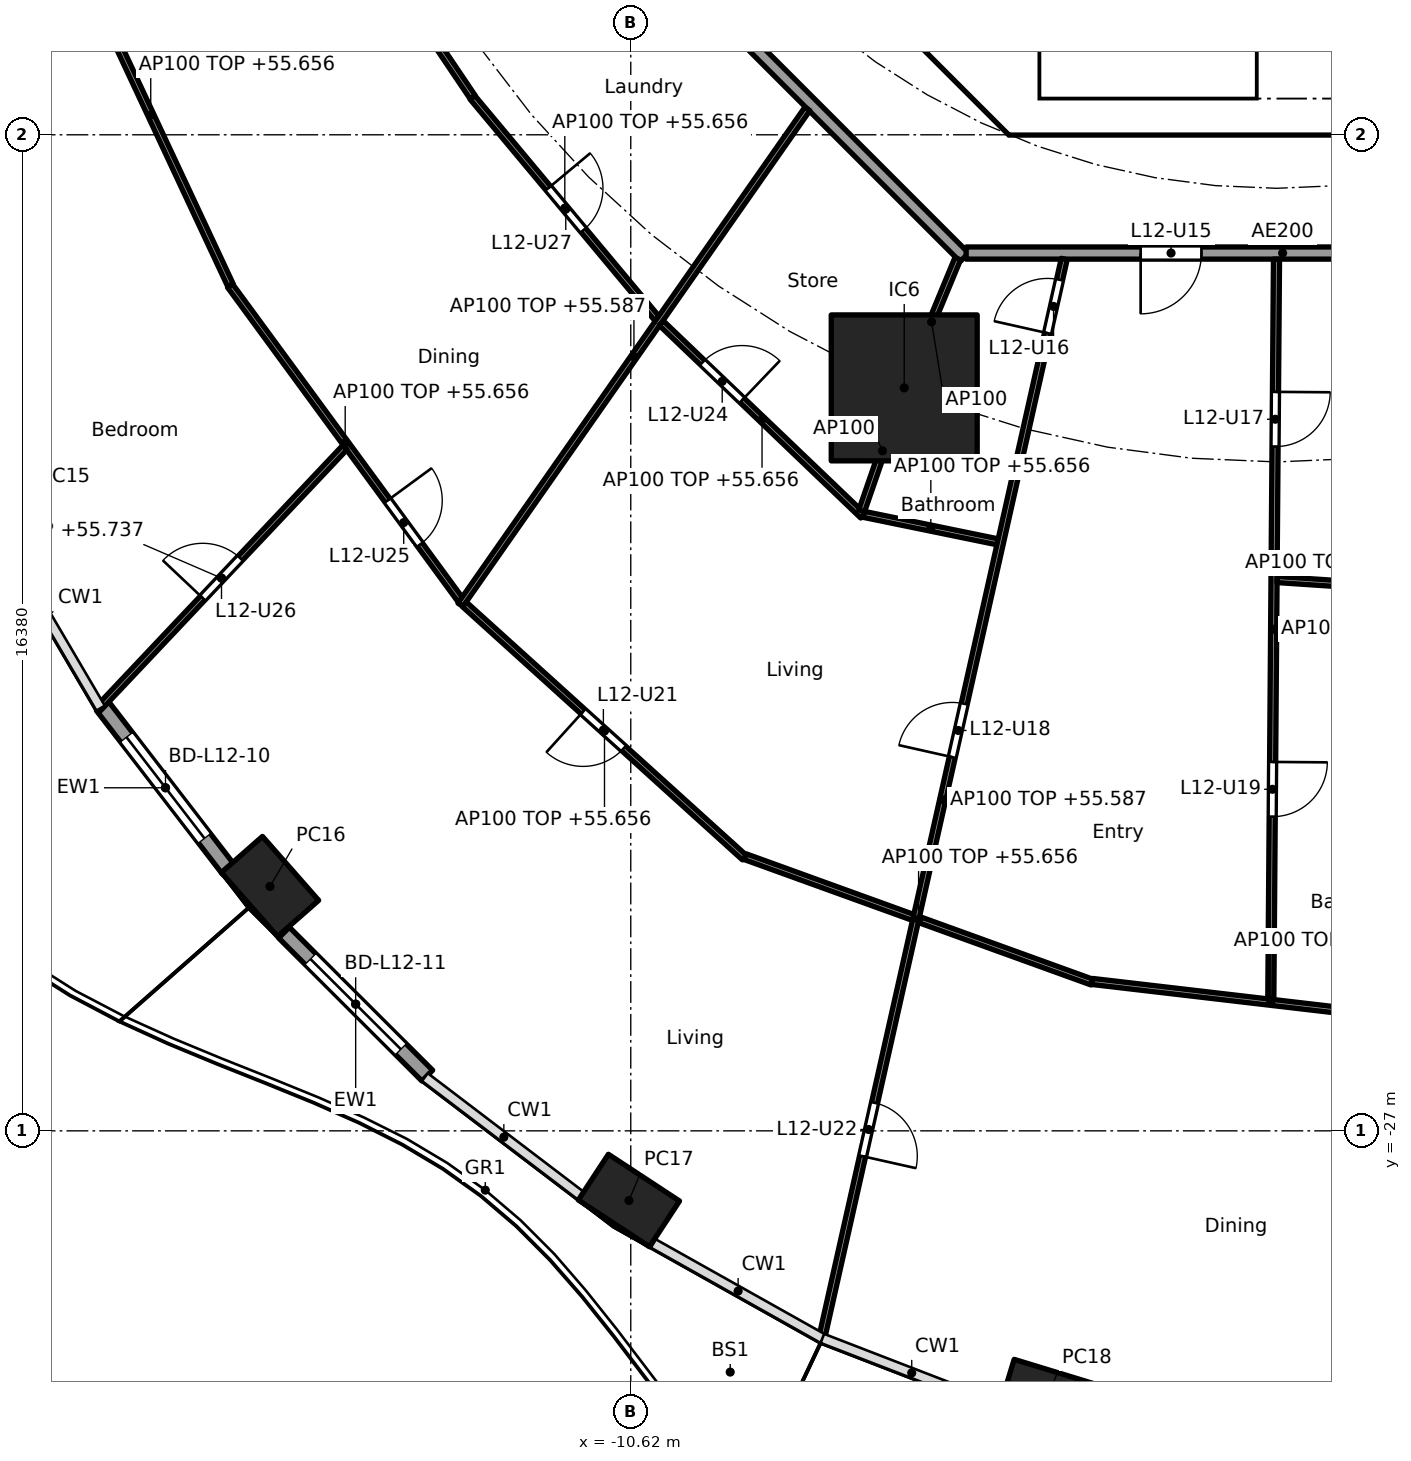
"""IFC4 building model, lengths in metres.
Left out: names, types, materials, properties, quantities, classifications, styles, units other than length and angle.
Written with IfcOpenShell. Run it as: python <this file> out.ifc"""

import sys

from ifc_helpers import new_model, si_unit, direction, frame, frame_2d, origin, origin_2d, place, context, subcontext, project, spatial, polyline, rectangle, hollow_rectangle, outline, extrude, element, fill, save


model = new_model("IFC4")
c1 = context("Model", 3, precision=1e-05, world=origin(), true_north=direction((0.0, 1.0)))
c2 = subcontext(c1, "Body", "Model", "MODEL_VIEW")
j1 = project(units=[si_unit("LENGTHUNIT", "METRE"), si_unit("PLANEANGLEUNIT", "RADIAN")], contexts=[c1])
p1 = place(None, origin())
s1 = spatial("IfcSite", under=j1, at=p1, CompositionType="ELEMENT")
p2 = place(p1, origin())
s2 = spatial("IfcBuilding", under=s1, at=p2, CompositionType="ELEMENT")
p3 = place(p2, frame((0.0, 0.0, 52.9)))
s3 = spatial("IfcBuildingStorey", under=s2, at=p3, CompositionType="ELEMENT", Elevation=52.9)
for number, where, z_axis, x_axis in (
    (1, (-16.552, -22.981, 0.0), (0.0, 0.0, 1.0), (0.66, -0.751, 0.0)),
    (2, (-10.65, -28.146, 0.0), (0.0, 0.0, 1.0), (0.836, -0.549, 0.0)),
    (3, (-3.776, -31.393, 0.0), (0.0, 0.0, 1.0), (0.957, -0.292, 0.0)),
):
    element("IfcColumn", number, at=place(p3, frame(where, z_axis=z_axis, x_axis=x_axis)), inside=s3, PredefinedType="COLUMN", context=c2, shape_type="SweptSolid", body=[
        extrude(hollow_rectangle(XDim=1.4, YDim=0.9, WallThickness=0.05, at=origin_2d()), origin(), (0.0, 0.0, 1.0), 3.7),
    ])
p4 = place(p3, frame((-6.123, -14.782, 0.0), z_axis=(0.0, 0.0, 1.0), x_axis=(1.0, 0.0, 0.0)))
e4 = element("IfcColumn", 4, at=p4, inside=s3, PredefinedType="COLUMN", context=c2, shape_type="SweptSolid", body=[
    extrude(rectangle(XDim=2.4, YDim=2.4, at=origin_2d()), origin(), (0.0, 0.0, 1.0), 3.7),
])
p5 = place(p3, frame((-17.234, -22.704, 0.0), z_axis=(0.0, 0.0, 1.0), x_axis=(-0.610457147657, 0.792049285635, 0.0)))
e5 = element("IfcWall", 5, at=p5, inside=s3, PredefinedType="SOLIDWALL", context=c2, shape_type="SweptSolid", body=[
    extrude(rectangle(XDim=3.397, YDim=0.25, at=frame_2d((1.699, 0.0))), origin(), (0.0, 0.0, 1.0), 3.44),
])
p6 = place(p5, frame((0.649, 0.0, 0.0)))
e6 = element("IfcOpeningElement", 6, at=p6, cuts=e5, PredefinedType="OPENING", context=c2, shape_type="SweptSolid", body=[
    extrude(rectangle(XDim=2.1, YDim=2.4, at=frame_2d((1.05, 1.2))), frame((0.0, 0.135, 0.0), z_axis=(0.0, -1.0, 0.0), x_axis=(1.0, 0.0, 0.0)), (0.0, 0.0, 1.0), 0.27),
])
p7 = place(p3, frame((-13.966, -26.092, 0.0), z_axis=(0.0, 0.0, 1.0), x_axis=(-0.707803094595, 0.706409781417, 0.0)))
e7 = element("IfcWall", 7, at=p7, inside=s3, PredefinedType="SOLIDWALL", context=c2, shape_type="SweptSolid", body=[
    extrude(rectangle(XDim=3.329, YDim=0.25, at=frame_2d((1.665, 0.0))), origin(), (0.0, 0.0, 1.0), 3.44),
])
p8 = place(p7, frame((0.615, 0.0, 0.0)))
e8 = element("IfcOpeningElement", 8, at=p8, cuts=e7, PredefinedType="OPENING", context=c2, shape_type="SweptSolid", body=[
    extrude(rectangle(XDim=2.1, YDim=2.4, at=frame_2d((1.05, 1.2))), frame((0.0, 0.135, 0.0), z_axis=(0.0, -1.0, 0.0), x_axis=(1.0, 0.0, 0.0)), (0.0, 0.0, 1.0), 0.27),
])
p9 = place(p3, frame((-9.988, -4.613, 0.0), z_axis=(0.0, 0.0, 1.0), x_axis=(0.707106781187, -0.707106781187, 0.0)))
e9 = element("IfcWall", 9, at=p9, inside=s3, PredefinedType="SHEAR", context=c2, shape_type="SweptSolid", body=[
    extrude(rectangle(XDim=7.602, YDim=0.6, at=frame_2d((3.801, 0.0))), origin(), (0.0, 0.0, 1.0), 3.44),
])
p10 = place(p9, frame((6.151, 0.0, 0.0)))
e10 = element("IfcOpeningElement", 10, at=p10, cuts=e9, PredefinedType="OPENING", context=c2, shape_type="SweptSolid", body=[
    extrude(rectangle(XDim=1.1, YDim=2.1, at=frame_2d((0.55, 1.05))), frame((0.0, 0.31, 0.0), z_axis=(0.0, -1.0, 0.0), x_axis=(1.0, 0.0, 0.0)), (0.0, 0.0, 1.0), 0.62),
])
p11 = place(p3, origin())
e11 = element("IfcWall", 11, at=p11, inside=s3, PredefinedType="SHEAR", context=c2, shape_type="SweptSolid", body=[
    extrude(outline(polyline([(-4.152, -10.025), (4.152, -10.025), (4.401, -9.776), (4.825, -10.2), (4.401, -10.625), (-4.401, -10.625), (-4.825, -10.2), (-4.401, -9.776), (-4.152, -10.025)])), origin(), (0.0, 0.0, 1.0), 3.44),
])
p12 = place(p3, origin())
e12 = element("IfcWall", 12, at=p12, inside=s3, PredefinedType="SOLIDWALL", context=c2, shape_type="SweptSolid", body=[
    extrude(outline(polyline([(-3.9, -10.025), (-4.1, -10.025), (-4.1, -7.025), (-3.9, -7.025), (-3.9, -10.025)])), origin(), (0.0, 0.0, 1.0), 3.44),
])
p13 = place(p3, frame((-12.635, -5.134, 0.0), z_axis=(0.0, 0.0, 1.0), x_axis=(0.707106781187, -0.707106781187, 0.0)))
e13 = element("IfcWall", 13, at=p13, inside=s3, PredefinedType="PARTITIONING", context=c2, shape_type="SweptSolid", body=[
    extrude(rectangle(XDim=10.609, YDim=0.2, at=frame_2d((5.305, 0.0))), origin(), (0.0, 0.0, 1.0), 3.44),
])
p14 = place(p3, frame((-5.104, -12.565, 0.0), z_axis=(0.0, 0.0, 1.0), x_axis=(1.0, 0.0, 0.0)))
e14 = element("IfcWall", 14, at=p14, inside=s3, PredefinedType="PARTITIONING", context=c2, shape_type="SweptSolid", body=[
    extrude(rectangle(XDim=10.409, YDim=0.2, at=frame_2d((5.205, 0.0))), origin(), (0.0, 0.0, 1.0), 3.44),
])
p15 = place(p14, frame((2.87, 0.0, 0.0)))
e15 = element("IfcOpeningElement", 15, at=p15, cuts=e14, PredefinedType="OPENING", context=c2, shape_type="SweptSolid", body=[
    extrude(rectangle(XDim=1.0, YDim=2.1, at=frame_2d((0.5, 1.05))), frame((0.0, 0.11, 0.0), z_axis=(0.0, -1.0, 0.0), x_axis=(1.0, 0.0, 0.0)), (0.0, 0.0, 1.0), 0.22),
])
p16 = place(p3, frame((-15.627, -6.432, 0.0), z_axis=(0.0, 0.0, 1.0), x_axis=(0.559112679527, -0.829091678641, 0.0)))
e16 = element("IfcWall", 16, at=p16, inside=s3, PredefinedType="PARTITIONING", context=c2, shape_type="SweptSolid", body=[
    extrude(rectangle(XDim=4.308, YDim=0.1, at=frame_2d((2.154, 0.0))), origin(), (0.0, 0.0, 1.0), 3.44),
])
p17 = place(p3, frame((-19.826, -7.491, 0.0), z_axis=(0.0, 0.0, 1.0), x_axis=(0.423926333401, -0.905696673202, 0.0)))
e17 = element("IfcWall", 17, at=p17, inside=s3, PredefinedType="PARTITIONING", context=c2, shape_type="SweptSolid", body=[
    extrude(rectangle(XDim=6.188, YDim=0.1, at=frame_2d((3.094, 0.0))), origin(), (0.0, 0.0, 1.0), 2.756),
])
p18 = place(p3, frame((-13.222, -10.007, 0.0), z_axis=(0.0, 0.0, 1.0), x_axis=(0.640807748916, -0.767701393075, 0.0)))
e18 = element("IfcWall", 18, at=p18, inside=s3, PredefinedType="PARTITIONING", context=c2, shape_type="SweptSolid", body=[
    extrude(rectangle(XDim=4.737, YDim=0.1, at=frame_2d((2.368, 0.0))), origin(), (0.0, 0.0, 1.0), 2.756),
])
p19 = place(p18, frame((1.943, 0.0, 0.0)))
e19 = element("IfcOpeningElement", 19, at=p19, cuts=e18, PredefinedType="OPENING", context=c2, shape_type="SweptSolid", body=[
    extrude(rectangle(XDim=0.9, YDim=2.1, at=frame_2d((0.45, 1.05))), frame((0.0, 0.06, 0.0), z_axis=(0.0, -1.0, 0.0), x_axis=(1.0, 0.0, 0.0)), (0.0, 0.0, 1.0), 0.12),
])
p20 = place(p3, frame((-17.211, -13.1, 0.0), z_axis=(0.0, 0.0, 1.0), x_axis=(0.591206785834, -0.806520016109, 0.0)))
e20 = element("IfcWall", 20, at=p20, inside=s3, PredefinedType="PARTITIONING", context=c2, shape_type="SweptSolid", body=[
    extrude(rectangle(XDim=6.41, YDim=0.1, at=frame_2d((3.205, 0.0))), origin(), (0.0, 0.0, 1.0), 2.756),
])
p21 = place(p20, frame((4.383, 0.0, 0.0)))
e21 = element("IfcOpeningElement", 21, at=p21, cuts=e20, PredefinedType="OPENING", context=c2, shape_type="SweptSolid", body=[
    extrude(rectangle(XDim=0.9, YDim=2.1, at=frame_2d((0.45, 1.05))), frame((0.0, 0.06, 0.0), z_axis=(0.0, -1.0, 0.0), x_axis=(1.0, 0.0, 0.0)), (0.0, 0.0, 1.0), 0.12),
])
p22 = place(p3, frame((-15.321, -15.761, 0.0), z_axis=(0.0, 0.0, 1.0), x_axis=(-0.686519245775, -0.727111631856, 0.0)))
e22 = element("IfcWall", 22, at=p22, inside=s3, PredefinedType="PARTITIONING", context=c2, shape_type="SweptSolid", body=[
    extrude(rectangle(XDim=5.912, YDim=0.1, at=frame_2d((2.956, 0.0))), origin(), (0.0, 0.0, 1.0), 2.837),
])
p23 = place(p22, frame((2.506, 0.0, 0.0)))
e23 = element("IfcOpeningElement", 23, at=p23, cuts=e22, PredefinedType="OPENING", context=c2, shape_type="SweptSolid", body=[
    extrude(rectangle(XDim=0.9, YDim=2.1, at=frame_2d((0.45, 1.05))), frame((0.0, 0.06, 0.0), z_axis=(0.0, -1.0, 0.0), x_axis=(1.0, 0.0, 0.0)), (0.0, 0.0, 1.0), 0.12),
])
p24 = place(p3, frame((-7.715, -10.193, 0.0), z_axis=(0.0, 0.0, 1.0), x_axis=(-0.573126502256, -0.819466907454, 0.0)))
e24 = element("IfcWall", 24, at=p24, inside=s3, PredefinedType="PARTITIONING", context=c2, shape_type="SweptSolid", body=[
    extrude(rectangle(XDim=9.954, YDim=0.1, at=frame_2d((4.977, 0.0))), origin(), (0.0, 0.0, 1.0), 2.687),
])
p25 = place(p3, frame((-10.119, -13.716, 0.0), z_axis=(0.0, 0.0, 1.0), x_axis=(0.722763212502, -0.69109575216, 0.0)))
e25 = element("IfcWall", 25, at=p25, inside=s3, PredefinedType="PARTITIONING", context=c2, shape_type="SweptSolid", body=[
    extrude(rectangle(XDim=4.587, YDim=0.1, at=frame_2d((2.293, 0.0))), origin(), (0.0, 0.0, 1.0), 2.756),
])
p26 = place(p25, frame((0.938, 0.0, 0.0)))
e26 = element("IfcOpeningElement", 26, at=p26, cuts=e25, PredefinedType="OPENING", context=c2, shape_type="SweptSolid", body=[
    extrude(rectangle(XDim=0.9, YDim=2.1, at=frame_2d((0.45, 1.05))), frame((0.0, 0.06, 0.0), z_axis=(0.0, -1.0, 0.0), x_axis=(1.0, 0.0, 0.0)), (0.0, 0.0, 1.0), 0.12),
])
p27 = place(p3, frame((-13.355, -18.343, 0.0), z_axis=(0.0, 0.0, 1.0), x_axis=(0.741720189244, -0.670709445936, 0.0)))
e27 = element("IfcWall", 27, at=p27, inside=s3, PredefinedType="PARTITIONING", context=c2, shape_type="SweptSolid", body=[
    extrude(rectangle(XDim=6.209, YDim=0.1, at=frame_2d((3.104, 0.0))), origin(), (0.0, 0.0, 1.0), 2.756),
])
p28 = place(p27, frame((2.63, 0.0, 0.0)))
e28 = element("IfcOpeningElement", 28, at=p28, cuts=e27, PredefinedType="OPENING", context=c2, shape_type="SweptSolid", body=[
    extrude(rectangle(XDim=0.9, YDim=2.1, at=frame_2d((0.45, 1.05))), frame((0.0, 0.06, 0.0), z_axis=(0.0, -1.0, 0.0), x_axis=(1.0, 0.0, 0.0)), (0.0, 0.0, 1.0), 0.12),
])
p29 = place(p3, frame((-5.243, -12.657, 0.0), z_axis=(0.0, 0.0, 1.0), x_axis=(-0.382719158442, -0.923864733477, 0.0)))
e29 = element("IfcWall", 29, at=p29, inside=s3, PredefinedType="PARTITIONING", context=c2, shape_type="SweptSolid", body=[
    extrude(rectangle(XDim=2.25, YDim=0.1, at=frame_2d((1.125, 0.0))), origin(), (0.0, 0.0, 1.0), 3.44),
])
p30 = place(p3, frame((-6.139, -14.83, 0.0), z_axis=(0.0, 0.0, 1.0), x_axis=(-0.327246993321, -0.944938836837, 0.0)))
e30 = element("IfcWall", 30, at=p30, inside=s3, PredefinedType="PARTITIONING", context=c2, shape_type="SweptSolid", body=[
    extrude(rectangle(XDim=2.09, YDim=0.1, at=frame_2d((1.045, 0.0))), origin(), (0.0, 0.0, 1.0), 3.44),
])
p31 = place(p3, frame((-6.791, -16.862, 0.0), z_axis=(0.0, 0.0, 1.0), x_axis=(0.979581941859, -0.201045316246, 0.0)))
e31 = element("IfcWall", 31, at=p31, inside=s3, PredefinedType="PARTITIONING", context=c2, shape_type="SweptSolid", body=[
    extrude(rectangle(XDim=2.256, YDim=0.1, at=frame_2d((1.128, 0.0))), origin(), (0.0, 0.0, 1.0), 2.756),
])
p32 = place(p3, frame((-8.739, -22.491, 0.0), z_axis=(0.0, 0.0, 1.0), x_axis=(0.940401691072, -0.340065669288, 0.0)))
e32 = element("IfcWall", 32, at=p32, inside=s3, PredefinedType="PARTITIONING", context=c2, shape_type="SweptSolid", body=[
    extrude(rectangle(XDim=6.067, YDim=0.1, at=frame_2d((3.034, 0.0))), origin(), (0.0, 0.0, 1.0), 2.756),
])
p33 = place(p3, frame((-3.492, -12.662, 0.0), z_axis=(0.0, 0.0, 1.0), x_axis=(-0.219268088006, -0.975664648115, 0.0)))
e33 = element("IfcWall", 33, at=p33, inside=s3, PredefinedType="PARTITIONING", context=c2, shape_type="SweptSolid", body=[
    extrude(rectangle(XDim=18.23, YDim=0.1, at=frame_2d((9.115, 0.0))), origin(), (0.0, 0.0, 1.0), 2.687),
])
p34 = place(p33, frame((0.35, 0.0, 0.0)))
e34 = element("IfcOpeningElement", 34, at=p34, cuts=e33, PredefinedType="OPENING", context=c2, shape_type="SweptSolid", body=[
    extrude(rectangle(XDim=0.9, YDim=2.1, at=frame_2d((0.45, 1.05))), frame((0.0, 0.06, 0.0), z_axis=(0.0, -1.0, 0.0), x_axis=(1.0, 0.0, 0.0)), (0.0, 0.0, 1.0), 0.12),
])
p35 = place(p33, frame((7.497, 0.0, 0.0)))
e35 = element("IfcOpeningElement", 35, at=p35, cuts=e33, PredefinedType="OPENING", context=c2, shape_type="SweptSolid", body=[
    extrude(rectangle(XDim=0.9, YDim=2.1, at=frame_2d((0.45, 1.05))), frame((0.0, 0.06, 0.0), z_axis=(0.0, -1.0, 0.0), x_axis=(1.0, 0.0, 0.0)), (0.0, 0.0, 1.0), 0.12),
])
p36 = place(p33, frame((14.223, 0.0, 0.0)))
e36 = element("IfcOpeningElement", 36, at=p36, cuts=e33, PredefinedType="OPENING", context=c2, shape_type="SweptSolid", body=[
    extrude(rectangle(XDim=0.9, YDim=2.1, at=frame_2d((0.45, 1.05))), frame((0.0, 0.06, 0.0), z_axis=(0.0, -1.0, 0.0), x_axis=(1.0, 0.0, 0.0)), (0.0, 0.0, 1.0), 0.12),
])
p37 = place(p3, frame((-3.031, -24.543, 0.0), z_axis=(0.0, 0.0, 1.0), x_axis=(0.993255612046, -0.115945198862, 0.0)))
e37 = element("IfcWall", 37, at=p37, inside=s3, PredefinedType="PARTITIONING", context=c2, shape_type="SweptSolid", body=[
    extrude(rectangle(XDim=5.913, YDim=0.1, at=frame_2d((2.956, 0.0))), origin(), (0.0, 0.0, 1.0), 2.756),
])
p38 = place(p3, frame((-0.001, -12.665, 0.0), z_axis=(0.0, 0.0, 1.0), x_axis=(-0.007702417287, -0.999970335944, 0.0)))
e38 = element("IfcWall", 38, at=p38, inside=s3, PredefinedType="PARTITIONING", context=c2, shape_type="SweptSolid", body=[
    extrude(rectangle(XDim=12.171, YDim=0.1, at=frame_2d((6.086, 0.0))), origin(), (0.0, 0.0, 1.0), 2.687),
])
p39 = place(p38, frame((2.183, 0.0, 0.0)))
e39 = element("IfcOpeningElement", 39, at=p39, cuts=e38, PredefinedType="OPENING", context=c2, shape_type="SweptSolid", body=[
    extrude(rectangle(XDim=0.9, YDim=2.1, at=frame_2d((0.45, 1.05))), frame((0.0, 0.06, 0.0), z_axis=(0.0, -1.0, 0.0), x_axis=(1.0, 0.0, 0.0)), (0.0, 0.0, 1.0), 0.12),
])
p40 = place(p38, frame((8.269, 0.0, 0.0)))
e40 = element("IfcOpeningElement", 40, at=p40, cuts=e38, PredefinedType="OPENING", context=c2, shape_type="SweptSolid", body=[
    extrude(rectangle(XDim=0.9, YDim=2.1, at=frame_2d((0.45, 1.05))), frame((0.0, 0.06, 0.0), z_axis=(0.0, -1.0, 0.0), x_axis=(1.0, 0.0, 0.0)), (0.0, 0.0, 1.0), 0.12),
])
p41 = place(p3, frame((0.009, -17.934, 0.0), z_axis=(0.0, 0.0, 1.0), x_axis=(0.997794542617, -0.066378089183, 0.0)))
e41 = element("IfcWall", 41, at=p41, inside=s3, PredefinedType="PARTITIONING", context=c2, shape_type="SweptSolid", body=[
    extrude(rectangle(XDim=2.185, YDim=0.1, at=frame_2d((1.092, 0.0))), origin(), (0.0, 0.0, 1.0), 2.756),
])
p42 = place(p6, origin())
e42 = element("IfcDoor", 42, at=p42, inside=s3, OperationType="SLIDING_TO_LEFT", PredefinedType="DOOR", context=c2, shape_type="SweptSolid", body=[
    extrude(rectangle(XDim=2.1, YDim=2.4, at=frame_2d((1.05, 1.2))), frame((0.0, 0.025, 0.0), z_axis=(0.0, -1.0, 0.0), x_axis=(1.0, 0.0, 0.0)), (0.0, 0.0, 1.0), 0.05),
])
fill(e6, e42)
p43 = place(p8, origin())
e43 = element("IfcDoor", 43, at=p43, inside=s3, OperationType="SLIDING_TO_LEFT", PredefinedType="DOOR", context=c2, shape_type="SweptSolid", body=[
    extrude(rectangle(XDim=2.1, YDim=2.4, at=frame_2d((1.05, 1.2))), frame((0.0, 0.025, 0.0), z_axis=(0.0, -1.0, 0.0), x_axis=(1.0, 0.0, 0.0)), (0.0, 0.0, 1.0), 0.05),
])
fill(e8, e43)
p44 = place(p10, origin())
e44 = element("IfcDoor", 44, at=p44, inside=s3, OperationType="SINGLE_SWING_LEFT", PredefinedType="DOOR", context=c2, shape_type="SweptSolid", body=[
    extrude(rectangle(XDim=1.1, YDim=2.1, at=frame_2d((0.55, 1.05))), frame((0.0, 0.025, 0.0), z_axis=(0.0, -1.0, 0.0), x_axis=(1.0, 0.0, 0.0)), (0.0, 0.0, 1.0), 0.05),
])
fill(e10, e44)
p45 = place(p15, frame((1.0, 0.0, 0.0), x_axis=(-1.0, 0.0, 0.0)))
e45 = element("IfcDoor", 45, at=p45, inside=s3, OperationType="SINGLE_SWING_RIGHT", PredefinedType="DOOR", context=c2, shape_type="SweptSolid", body=[
    extrude(rectangle(XDim=1.0, YDim=2.1, at=frame_2d((0.5, 1.05))), frame((0.0, 0.025, 0.0), z_axis=(0.0, -1.0, 0.0), x_axis=(1.0, 0.0, 0.0)), (0.0, 0.0, 1.0), 0.05),
])
fill(e15, e45)
p46 = place(p34, frame((0.9, 0.0, 0.0), x_axis=(-1.0, 0.0, 0.0)))
e46 = element("IfcDoor", 46, at=p46, inside=s3, OperationType="SINGLE_SWING_LEFT", PredefinedType="DOOR", context=c2, shape_type="SweptSolid", body=[
    extrude(rectangle(XDim=0.9, YDim=2.1, at=frame_2d((0.45, 1.05))), frame((0.0, 0.025, 0.0), z_axis=(0.0, -1.0, 0.0), x_axis=(1.0, 0.0, 0.0)), (0.0, 0.0, 1.0), 0.05),
])
fill(e34, e46)
p47 = place(p39, origin())
e47 = element("IfcDoor", 47, at=p47, inside=s3, OperationType="SINGLE_SWING_LEFT", PredefinedType="DOOR", context=c2, shape_type="SweptSolid", body=[
    extrude(rectangle(XDim=0.9, YDim=2.1, at=frame_2d((0.45, 1.05))), frame((0.0, 0.025, 0.0), z_axis=(0.0, -1.0, 0.0), x_axis=(1.0, 0.0, 0.0)), (0.0, 0.0, 1.0), 0.05),
])
fill(e39, e47)
p48 = place(p35, frame((0.9, 0.0, 0.0), x_axis=(-1.0, 0.0, 0.0)))
e48 = element("IfcDoor", 48, at=p48, inside=s3, OperationType="SINGLE_SWING_LEFT", PredefinedType="DOOR", context=c2, shape_type="SweptSolid", body=[
    extrude(rectangle(XDim=0.9, YDim=2.1, at=frame_2d((0.45, 1.05))), frame((0.0, 0.025, 0.0), z_axis=(0.0, -1.0, 0.0), x_axis=(1.0, 0.0, 0.0)), (0.0, 0.0, 1.0), 0.05),
])
fill(e35, e48)
p49 = place(p40, origin())
e49 = element("IfcDoor", 49, at=p49, inside=s3, OperationType="SINGLE_SWING_LEFT", PredefinedType="DOOR", context=c2, shape_type="SweptSolid", body=[
    extrude(rectangle(XDim=0.9, YDim=2.1, at=frame_2d((0.45, 1.05))), frame((0.0, 0.025, 0.0), z_axis=(0.0, -1.0, 0.0), x_axis=(1.0, 0.0, 0.0)), (0.0, 0.0, 1.0), 0.05),
])
fill(e40, e49)
p50 = place(p28, frame((0.9, 0.0, 0.0), x_axis=(-1.0, 0.0, 0.0)))
e50 = element("IfcDoor", 50, at=p50, inside=s3, OperationType="SINGLE_SWING_RIGHT", PredefinedType="DOOR", context=c2, shape_type="SweptSolid", body=[
    extrude(rectangle(XDim=0.9, YDim=2.1, at=frame_2d((0.45, 1.05))), frame((0.0, 0.025, 0.0), z_axis=(0.0, -1.0, 0.0), x_axis=(1.0, 0.0, 0.0)), (0.0, 0.0, 1.0), 0.05),
])
fill(e28, e50)
p51 = place(p36, origin())
e51 = element("IfcDoor", 51, at=p51, inside=s3, OperationType="SINGLE_SWING_RIGHT", PredefinedType="DOOR", context=c2, shape_type="SweptSolid", body=[
    extrude(rectangle(XDim=0.9, YDim=2.1, at=frame_2d((0.45, 1.05))), frame((0.0, 0.025, 0.0), z_axis=(0.0, -1.0, 0.0), x_axis=(1.0, 0.0, 0.0)), (0.0, 0.0, 1.0), 0.05),
])
fill(e36, e51)
p52 = place(p26, origin())
e52 = element("IfcDoor", 52, at=p52, inside=s3, OperationType="SINGLE_SWING_RIGHT", PredefinedType="DOOR", context=c2, shape_type="SweptSolid", body=[
    extrude(rectangle(XDim=0.9, YDim=2.1, at=frame_2d((0.45, 1.05))), frame((0.0, 0.025, 0.0), z_axis=(0.0, -1.0, 0.0), x_axis=(1.0, 0.0, 0.0)), (0.0, 0.0, 1.0), 0.05),
])
fill(e26, e52)
p53 = place(p21, origin())
e53 = element("IfcDoor", 53, at=p53, inside=s3, OperationType="SINGLE_SWING_LEFT", PredefinedType="DOOR", context=c2, shape_type="SweptSolid", body=[
    extrude(rectangle(XDim=0.9, YDim=2.1, at=frame_2d((0.45, 1.05))), frame((0.0, 0.025, 0.0), z_axis=(0.0, -1.0, 0.0), x_axis=(1.0, 0.0, 0.0)), (0.0, 0.0, 1.0), 0.05),
])
fill(e21, e53)
p54 = place(p23, frame((0.9, 0.0, 0.0), x_axis=(-1.0, 0.0, 0.0)))
e54 = element("IfcDoor", 54, at=p54, inside=s3, OperationType="SINGLE_SWING_LEFT", PredefinedType="DOOR", context=c2, shape_type="SweptSolid", body=[
    extrude(rectangle(XDim=0.9, YDim=2.1, at=frame_2d((0.45, 1.05))), frame((0.0, 0.025, 0.0), z_axis=(0.0, -1.0, 0.0), x_axis=(1.0, 0.0, 0.0)), (0.0, 0.0, 1.0), 0.05),
])
fill(e23, e54)
p55 = place(p19, origin())
e55 = element("IfcDoor", 55, at=p55, inside=s3, OperationType="SINGLE_SWING_LEFT", PredefinedType="DOOR", context=c2, shape_type="SweptSolid", body=[
    extrude(rectangle(XDim=0.9, YDim=2.1, at=frame_2d((0.45, 1.05))), frame((0.0, 0.025, 0.0), z_axis=(0.0, -1.0, 0.0), x_axis=(1.0, 0.0, 0.0)), (0.0, 0.0, 1.0), 0.05),
])
fill(e19, e55)
save(model, sys.argv[1])
